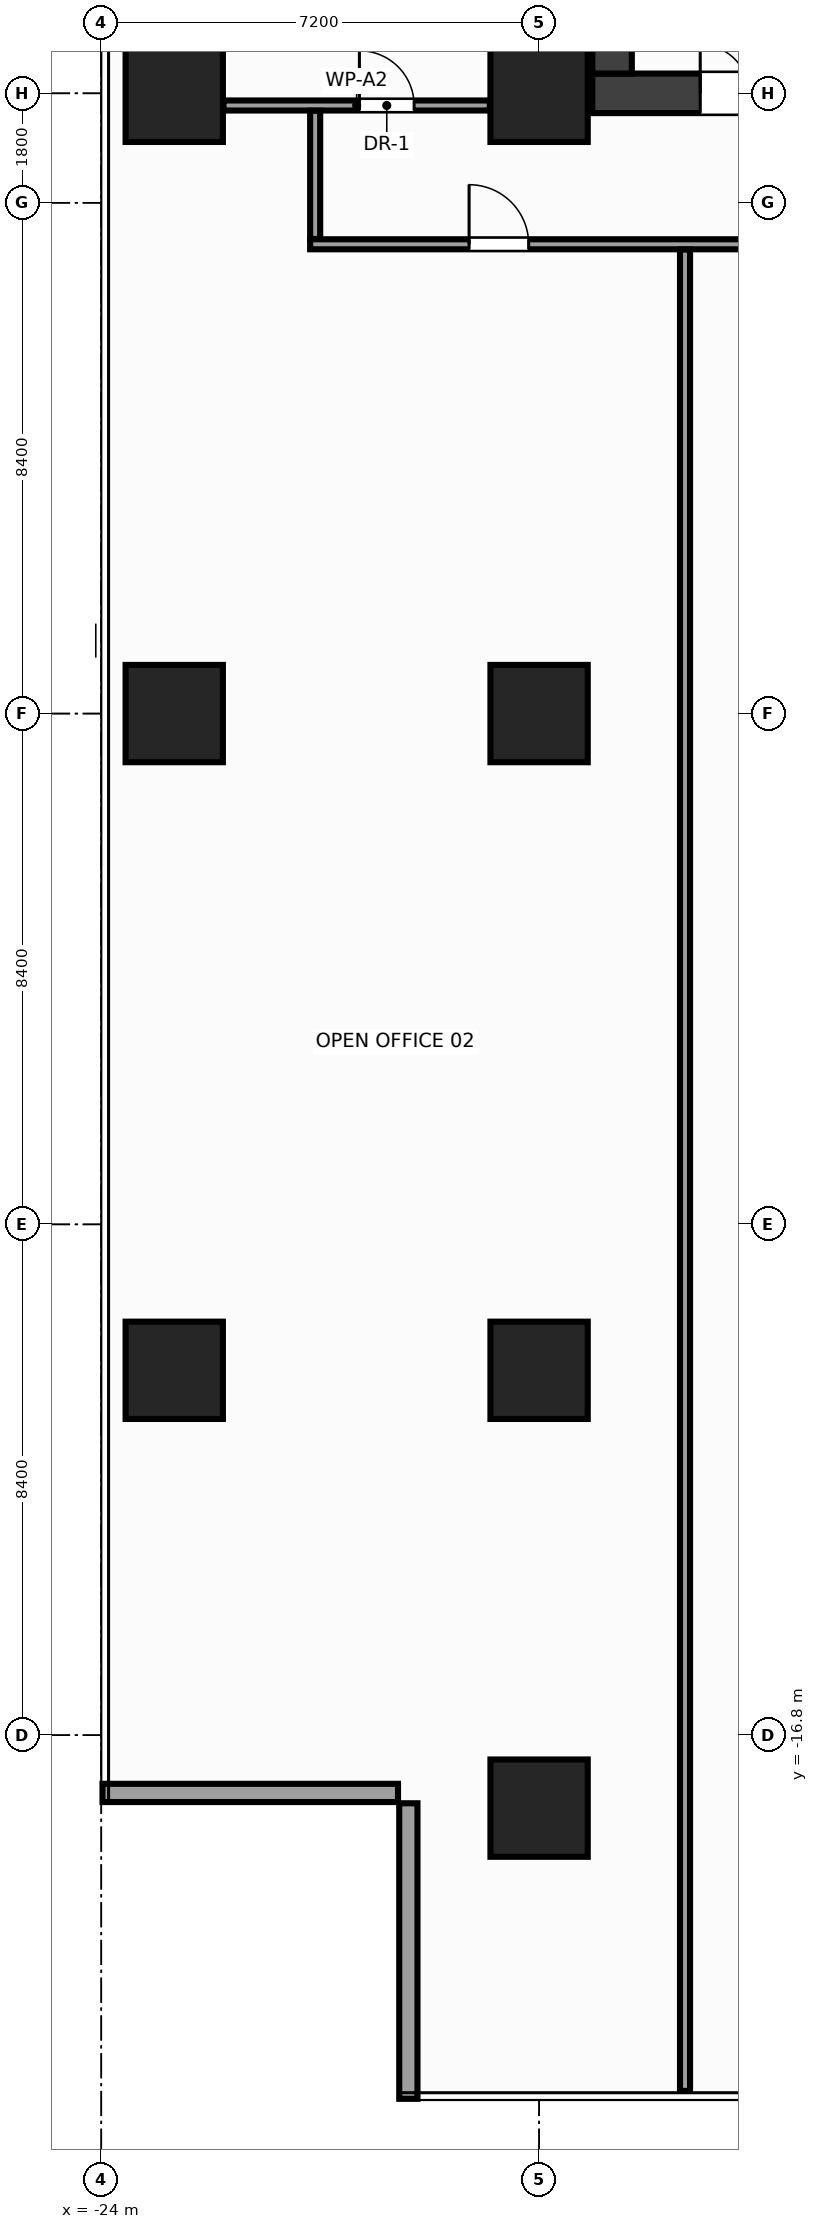
"""IFC4 building model, lengths in metres.
Left out: names, types, materials, properties, quantities, classifications, styles, units other than length and angle.
Written with IfcOpenShell. Run it as: python <this file> out.ifc"""

import sys

from ifc_helpers import new_model, si_unit, direction, frame, frame_2d, origin, origin_2d, place, context, subcontext, project, spatial, rectangle, extrude, source, transform, mapped, element, fill, save


model = new_model("IFC4")
c1 = context("Model", 3, precision=1e-05, world=origin(), true_north=direction((0.0, 1.0)))
c2 = subcontext(c1, "Body", "Model", "MODEL_VIEW")
j1 = project(units=[si_unit("LENGTHUNIT", "METRE"), si_unit("PLANEANGLEUNIT", "RADIAN")], contexts=[c1])
p1 = place(None, origin())
s1 = spatial("IfcSite", under=j1, at=p1, CompositionType="ELEMENT")
p2 = place(p1, origin())
s2 = spatial("IfcBuilding", under=s1, at=p2, CompositionType="ELEMENT")
p3 = place(p2, frame((0.0, 0.0, 164.0)))
s3 = spatial("IfcBuildingStorey", under=s2, at=p3, CompositionType="ELEMENT", Elevation=164.0)
m1 = source(origin(), c2, "Body", "SweptSolid", [
    extrude(rectangle(XDim=31.85, YDim=0.65, at=frame_2d((15.925, 0.0))), origin(), (0.0, 0.0, 1.0), 3.6),
])
p4 = place(p3, frame((-15.925, 10.2, 0.0), z_axis=(0.0, 0.0, 1.0), x_axis=(1.0, 0.0, 0.0)))
e1 = element("IfcWall", 1, at=p4, inside=s3, PredefinedType="SHEAR", context=c2, shape_type="MappedRepresentation", body=[
    mapped(m1, transform((0.0, 0.0, 0.0), x_axis=(1.0, 0.0, 0.0), y_axis=(0.0, 1.0, 0.0), z_axis=(0.0, 0.0, 1.0), scale=1.0)),
])
p5 = place(p4, frame((1.775, 0.0, 0.0)))
e2 = element("IfcOpeningElement", 2, at=p5, cuts=e1, PredefinedType="OPENING", context=c2, shape_type="SweptSolid", body=[
    extrude(rectangle(XDim=1.6, YDim=2.15, at=frame_2d((0.8, 1.075))), frame((0.0, 0.337, 0.0), z_axis=(0.0, -1.0, 0.0), x_axis=(1.0, 0.0, 0.0)), (0.0, 0.0, 1.0), 0.674),
])
p6 = place(p4, frame((28.475, 0.0, 0.0)))
e3 = element("IfcOpeningElement", 3, at=p6, cuts=e1, PredefinedType="OPENING", context=c2, shape_type="SweptSolid", body=[
    extrude(rectangle(XDim=1.6, YDim=2.15, at=frame_2d((0.8, 1.075))), frame((0.0, 0.337, 0.0), z_axis=(0.0, -1.0, 0.0), x_axis=(1.0, 0.0, 0.0)), (0.0, 0.0, 1.0), 0.674),
])
p7 = place(p4, frame((15.175, 0.0, 0.0)))
e4 = element("IfcOpeningElement", 4, at=p7, cuts=e1, PredefinedType="OPENING", context=c2, shape_type="SweptSolid", body=[
    extrude(rectangle(XDim=1.5, YDim=2.2, at=frame_2d((0.75, 1.1))), frame((0.0, 0.337, 0.0), z_axis=(0.0, -1.0, 0.0), x_axis=(1.0, 0.0, 0.0)), (0.0, 0.0, 1.0), 0.674),
])
m2 = source(origin(), c2, "Body", "SweptSolid", [
    extrude(rectangle(XDim=12.95, YDim=0.65, at=frame_2d((6.475, 0.0))), origin(), (0.0, 0.0, 1.0), 3.6),
])
p8 = place(p3, frame((-15.6, 10.525, 0.0), z_axis=(0.0, 0.0, 1.0), x_axis=(0.0, 1.0, 0.0)))
e5 = element("IfcWall", 5, at=p8, inside=s3, PredefinedType="SHEAR", context=c2, shape_type="MappedRepresentation", body=[
    mapped(m2, transform((0.0, 0.0, 0.0), x_axis=(1.0, 0.0, 0.0), y_axis=(0.0, 1.0, 0.0), z_axis=(0.0, 0.0, 1.0), scale=1.0)),
])
m3 = source(origin(), c2, "Body", "SweptSolid", [
    extrude(rectangle(XDim=1.6, YDim=1.6, at=origin_2d()), origin(), (0.0, 0.0, 1.0), 3.6),
])
for number, where, z_axis, x_axis in (
    (6, (-16.8, -18.0, 0.0), (0.0, 0.0, 1.0), (1.0, 0.0, 0.0)),
    (7, (-16.8, -10.8, 0.0), (0.0, 0.0, 1.0), (1.0, 0.0, 0.0)),
    (8, (-16.8, 0.0, 0.0), (0.0, 0.0, 1.0), (1.0, 0.0, 0.0)),
    (9, (-16.8, 10.2, 0.0), (0.0, 0.0, 1.0), (1.0, 0.0, 0.0)),
    (10, (-22.8, -10.8, 0.0), (0.0, 0.0, 1.0), (1.0, 0.0, 0.0)),
    (11, (-22.8, 0.0, 0.0), (0.0, 0.0, 1.0), (1.0, 0.0, 0.0)),
    (12, (-22.8, 10.2, 0.0), (0.0, 0.0, 1.0), (1.0, 0.0, 0.0)),
):
    element("IfcColumn", number, at=place(p3, frame(where, z_axis=z_axis, x_axis=x_axis)), inside=s3, PredefinedType="COLUMN", context=c2, shape_type="MappedRepresentation", body=[
        mapped(m3, transform((0.0, 0.0, 0.0), x_axis=(1.0, 0.0, 0.0), y_axis=(0.0, 1.0, 0.0), z_axis=(0.0, 0.0, 1.0), scale=1.0)),
    ])
m4 = source(origin(), c2, "Body", "SweptSolid", [
    extrude(rectangle(XDim=4.86, YDim=0.3, at=frame_2d((2.43, 0.0))), origin(), (0.0, 0.0, 1.0), 2.76),
])
p9 = place(p3, frame((-23.98, -17.75, 0.0), z_axis=(0.0, 0.0, 1.0), x_axis=(1.0, 0.0, 0.0)))
e13 = element("IfcWall", 13, at=p9, inside=s3, PredefinedType="STANDARD", context=c2, shape_type="MappedRepresentation", body=[
    mapped(m4, transform((0.0, 0.0, 0.0), x_axis=(1.0, 0.0, 0.0), y_axis=(0.0, 1.0, 0.0), z_axis=(0.0, 0.0, 1.0), scale=1.0)),
])
m5 = source(origin(), c2, "Body", "SweptSolid", [
    extrude(rectangle(XDim=4.86, YDim=0.3, at=frame_2d((2.43, 0.0))), origin(), (0.0, 0.0, 1.0), 2.76),
])
p10 = place(p3, frame((-18.95, -17.92, 0.0), z_axis=(0.0, 0.0, 1.0), x_axis=(0.0, -1.0, 0.0)))
e14 = element("IfcWall", 14, at=p10, inside=s3, PredefinedType="STANDARD", context=c2, shape_type="MappedRepresentation", body=[
    mapped(m5, transform((0.0, 0.0, 0.0), x_axis=(1.0, 0.0, 0.0), y_axis=(0.0, 1.0, 0.0), z_axis=(0.0, 0.0, 1.0), scale=1.0)),
])
m6 = source(origin(), c2, "Body", "SweptSolid", [
    extrude(rectangle(XDim=4.38, YDim=0.165, at=frame_2d((2.19, 0.0))), origin(), (0.0, 0.0, 1.0), 2.915),
])
p11 = place(p3, frame((-21.99, 10.0, 0.0), z_axis=(0.0, 0.0, 1.0), x_axis=(1.0, 0.0, 0.0)))
e15 = element("IfcWall", 15, at=p11, inside=s3, PredefinedType="PARTITIONING", context=c2, shape_type="MappedRepresentation", body=[
    mapped(m6, transform((0.0, 0.0, 0.0), x_axis=(1.0, 0.0, 0.0), y_axis=(0.0, 1.0, 0.0), z_axis=(0.0, 0.0, 1.0), scale=1.0)),
])
p12 = place(p11, frame((2.235, 0.0, 0.0)))
e16 = element("IfcOpeningElement", 16, at=p12, cuts=e15, PredefinedType="OPENING", context=c2, shape_type="SweptSolid", body=[
    extrude(rectangle(XDim=0.9, YDim=2.15, at=frame_2d((0.45, 1.075))), frame((0.0, 0.094, 0.0), z_axis=(0.0, -1.0, 0.0), x_axis=(1.0, 0.0, 0.0)), (0.0, 0.0, 1.0), 0.189),
])
m7 = source(origin(), c2, "Body", "SweptSolid", [
    extrude(rectangle(XDim=31.6, YDim=0.165, at=frame_2d((15.8, 0.0))), origin(), (0.0, 0.0, 1.0), 2.765),
])
p13 = place(p3, frame((-20.565, 7.718, 0.0), z_axis=(0.0, 0.0, 1.0), x_axis=(1.0, 0.0, 0.0)))
e17 = element("IfcWall", 17, at=p13, inside=s3, PredefinedType="PARTITIONING", context=c2, shape_type="MappedRepresentation", body=[
    mapped(m7, transform((0.0, 0.0, 0.0), x_axis=(1.0, 0.0, 0.0), y_axis=(0.0, 1.0, 0.0), z_axis=(0.0, 0.0, 1.0), scale=1.0)),
])
p14 = place(p13, frame((2.614, 0.0, 0.0)))
e18 = element("IfcOpeningElement", 18, at=p14, cuts=e17, PredefinedType="OPENING", context=c2, shape_type="SweptSolid", body=[
    extrude(rectangle(XDim=0.98, YDim=2.15, at=frame_2d((0.49, 1.075))), frame((0.0, 0.094, 0.0), z_axis=(0.0, -1.0, 0.0), x_axis=(1.0, 0.0, 0.0)), (0.0, 0.0, 1.0), 0.189),
])
p15 = place(p13, frame((15.175, 0.0, 0.0)))
e19 = element("IfcOpeningElement", 19, at=p15, cuts=e17, PredefinedType="OPENING", context=c2, shape_type="SweptSolid", body=[
    extrude(rectangle(XDim=0.98, YDim=2.15, at=frame_2d((0.49, 1.075))), frame((0.0, 0.094, 0.0), z_axis=(0.0, -1.0, 0.0), x_axis=(1.0, 0.0, 0.0)), (0.0, 0.0, 1.0), 0.189),
])
p16 = place(p13, frame((27.874, 0.0, 0.0)))
e20 = element("IfcOpeningElement", 20, at=p16, cuts=e17, PredefinedType="OPENING", context=c2, shape_type="SweptSolid", body=[
    extrude(rectangle(XDim=0.98, YDim=2.15, at=frame_2d((0.49, 1.075))), frame((0.0, 0.094, 0.0), z_axis=(0.0, -1.0, 0.0), x_axis=(1.0, 0.0, 0.0)), (0.0, 0.0, 1.0), 0.189),
])
m8 = source(origin(), c2, "Body", "SweptSolid", [
    extrude(rectangle(XDim=2.108, YDim=0.165, at=frame_2d((1.054, 0.0))), origin(), (0.0, 0.0, 1.0), 3.38),
])
p17 = place(p3, frame((-20.482, 7.805, 0.0), z_axis=(0.0, 0.0, 1.0), x_axis=(0.0, 1.0, 0.0)))
e21 = element("IfcWall", 21, at=p17, inside=s3, PredefinedType="PARTITIONING", context=c2, shape_type="MappedRepresentation", body=[
    mapped(m8, transform((0.0, 0.0, 0.0), x_axis=(1.0, 0.0, 0.0), y_axis=(0.0, 1.0, 0.0), z_axis=(0.0, 0.0, 1.0), scale=1.0)),
])
m9 = source(origin(), c2, "Body", "SweptSolid", [
    extrude(rectangle(XDim=30.28, YDim=0.165, at=frame_2d((15.14, 0.0))), origin(), (0.0, 0.0, 1.0), 2.665),
])
p18 = place(p3, frame((-14.4, -22.65, 0.0), z_axis=(0.0, 0.0, 1.0), x_axis=(0.0, 1.0, 0.0)))
e22 = element("IfcWall", 22, at=p18, inside=s3, PredefinedType="PARTITIONING", context=c2, shape_type="MappedRepresentation", body=[
    mapped(m9, transform((0.0, 0.0, 0.0), x_axis=(1.0, 0.0, 0.0), y_axis=(0.0, 1.0, 0.0), z_axis=(0.0, 0.0, 1.0), scale=1.0)),
])
m10 = source(origin(), c2, "Body", "SweptSolid", [
    extrude(rectangle(XDim=1.6, YDim=2.15, at=frame_2d((0.8, 1.075))), frame((0.0, 0.025, 0.0), z_axis=(0.0, -1.0, 0.0), x_axis=(1.0, 0.0, 0.0)), (0.0, 0.0, 1.0), 0.05),
])
p19 = place(p5, origin())
e23 = element("IfcDoor", 23, at=p19, inside=s3, OperationType="DOUBLE_DOOR_SINGLE_SWING", PredefinedType="DOOR", context=c2, shape_type="MappedRepresentation", body=[
    mapped(m10, transform((0.0, 0.0, 0.0), x_axis=(1.0, 0.0, 0.0), y_axis=(0.0, 1.0, 0.0), z_axis=(0.0, 0.0, 1.0), scale=1.0)),
])
fill(e2, e23)
m11 = source(origin(), c2, "Body", "SweptSolid", [
    extrude(rectangle(XDim=0.9, YDim=2.15, at=frame_2d((0.45, 1.075))), frame((0.0, 0.025, 0.0), z_axis=(0.0, -1.0, 0.0), x_axis=(1.0, 0.0, 0.0)), (0.0, 0.0, 1.0), 0.05),
])
p20 = place(p12, origin())
e24 = element("IfcDoor", 24, at=p20, inside=s3, OperationType="SINGLE_SWING_LEFT", PredefinedType="DOOR", context=c2, shape_type="MappedRepresentation", body=[
    mapped(m11, transform((0.0, 0.0, 0.0), x_axis=(1.0, 0.0, 0.0), y_axis=(0.0, 1.0, 0.0), z_axis=(0.0, 0.0, 1.0), scale=1.0)),
])
fill(e16, e24)
m12 = source(origin(), c2, "Body", "SweptSolid", [
    extrude(rectangle(XDim=0.98, YDim=2.15, at=frame_2d((0.49, 1.075))), frame((0.0, 0.025, 0.0), z_axis=(0.0, -1.0, 0.0), x_axis=(1.0, 0.0, 0.0)), (0.0, 0.0, 1.0), 0.05),
])
p21 = place(p14, origin())
e25 = element("IfcDoor", 25, at=p21, inside=s3, OperationType="SINGLE_SWING_LEFT", PredefinedType="DOOR", context=c2, shape_type="MappedRepresentation", body=[
    mapped(m12, transform((0.0, 0.0, 0.0), x_axis=(1.0, 0.0, 0.0), y_axis=(0.0, 1.0, 0.0), z_axis=(0.0, 0.0, 1.0), scale=1.0)),
])
fill(e18, e25)
save(model, sys.argv[1])
